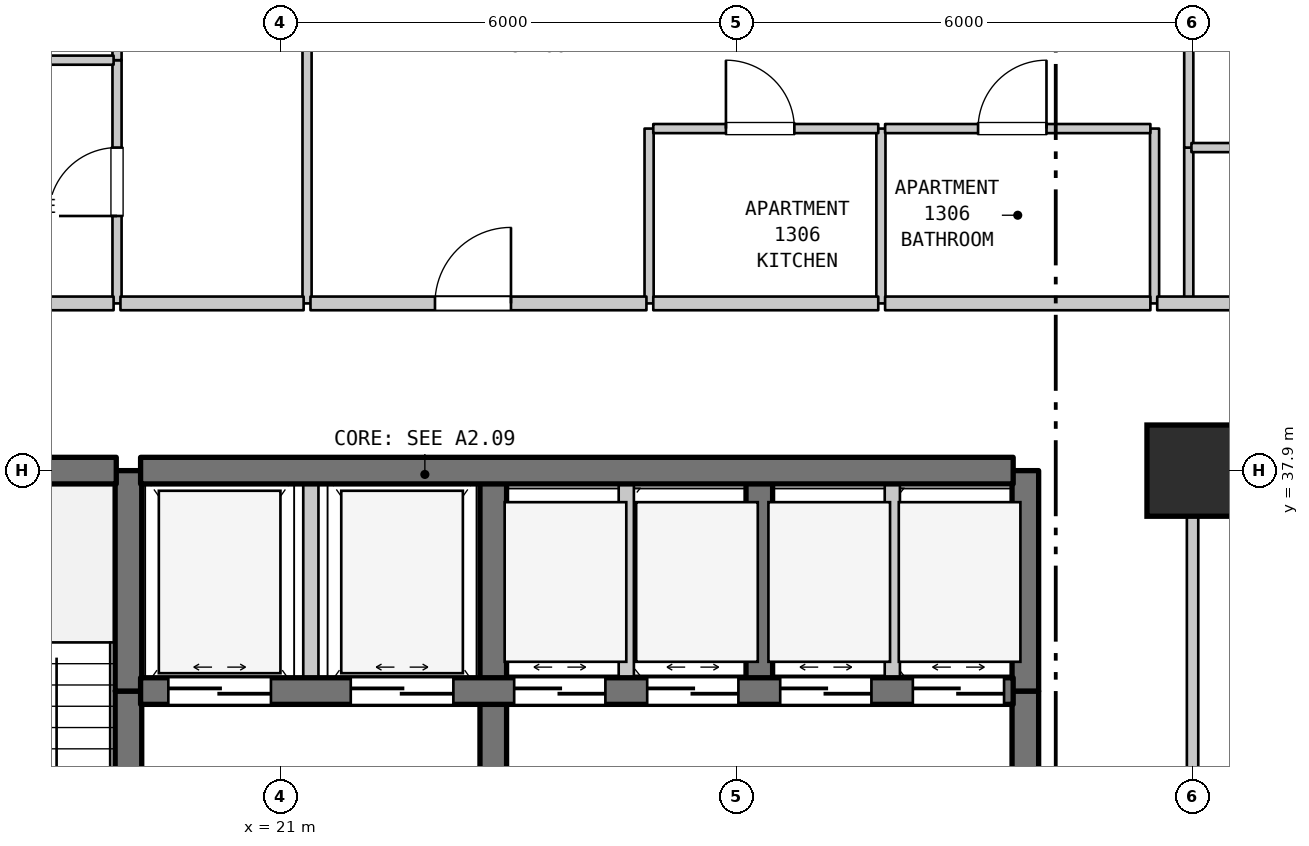
"""IFC4 building model, lengths in metres.
Left out: names, types, materials, properties, quantities, classifications, styles, units other than length and angle.
Written with IfcOpenShell. Run it as: python <this file> out.ifc"""

import sys

from ifc_helpers import new_model, si_unit, direction, frame, frame_2d, origin, origin_2d, place, context, subcontext, project, spatial, rectangle, extrude, element, fill, save


model = new_model("IFC4")
c1 = context("Model", 3, precision=1e-05, world=origin(), true_north=direction((0.0, 1.0)))
c2 = subcontext(c1, "Body", "Model", "MODEL_VIEW")
j1 = project(units=[si_unit("LENGTHUNIT", "METRE"), si_unit("PLANEANGLEUNIT", "RADIAN")], contexts=[c1])
p1 = place(None, origin())
s1 = spatial("IfcSite", under=j1, at=p1, CompositionType="ELEMENT")
p2 = place(p1, origin())
s2 = spatial("IfcBuilding", under=s1, at=p2, CompositionType="ELEMENT")
p3 = place(p2, frame((0.0, 0.0, 57.3)))
s3 = spatial("IfcBuildingStorey", under=s2, at=p3, CompositionType="ELEMENT", Elevation=57.3)
p4 = place(p3, frame((33.0, 37.9, 0.0), z_axis=(0.0, 0.0, 1.0), x_axis=(1.0, 0.0, 0.0)))
e1 = element("IfcColumn", 1, at=p4, inside=s3, PredefinedType="COLUMN", context=c2, shape_type="SweptSolid", body=[
    extrude(rectangle(XDim=1.2, YDim=1.2, at=origin_2d()), origin(), (0.0, 0.0, 1.0), 3.7),
])
p5 = place(p3, frame((18.85, 40.1, 0.0), z_axis=(0.0, 0.0, 1.0), x_axis=(0.0, 1.0, 0.0)))
e2 = element("IfcWall", 2, at=p5, inside=s3, PredefinedType="PARTITIONING", context=c2, shape_type="SweptSolid", body=[
    extrude(rectangle(XDim=3.2, YDim=0.12, at=frame_2d((1.6, 0.0))), origin(), (0.0, 0.0, 1.0), 3.28),
])
p6 = place(p5, frame((1.15, 0.0, 0.0)))
e3 = element("IfcOpeningElement", 3, at=p6, cuts=e2, PredefinedType="OPENING", context=c2, shape_type="SweptSolid", body=[
    extrude(rectangle(XDim=0.9, YDim=2.15, at=frame_2d((0.45, 1.075))), frame((0.0, 0.07, 0.0), z_axis=(0.0, -1.0, 0.0), x_axis=(1.0, 0.0, 0.0)), (0.0, 0.0, 1.0), 0.14),
])
p7 = place(p3, frame((18.85, 43.3, 0.0), z_axis=(0.0, 0.0, 1.0), x_axis=(0.0, 1.0, 0.0)))
e4 = element("IfcWall", 4, at=p7, inside=s3, PredefinedType="PARTITIONING", context=c2, shape_type="SweptSolid", body=[
    extrude(rectangle(XDim=2.9, YDim=0.12, at=frame_2d((1.45, 0.0))), origin(), (0.0, 0.0, 1.0), 3.28),
])
p8 = place(p3, frame((19.0, 29.5, 0.0), z_axis=(0.0, 0.0, 1.0), x_axis=(0.0, 1.0, 0.0)))
e5 = element("IfcWall", 5, at=p8, inside=s3, PredefinedType="SHEAR", context=c2, shape_type="SweptSolid", body=[
    extrude(rectangle(XDim=5.5, YDim=0.35, at=frame_2d((2.75, 0.0))), origin(), (0.0, 0.0, 1.0), 3.28),
])
p9 = place(p8, frame((2.025, 0.0, 0.0)))
e6 = element("IfcOpeningElement", 6, at=p9, cuts=e5, PredefinedType="OPENING", context=c2, shape_type="SweptSolid", body=[
    extrude(rectangle(XDim=1.1, YDim=2.15, at=frame_2d((0.55, 1.075))), frame((0.0, 0.185, 0.0), z_axis=(0.0, -1.0, 0.0), x_axis=(1.0, 0.0, 0.0)), (0.0, 0.0, 1.0), 0.37),
])
p10 = place(p3, frame((19.0, 35.0, 0.0), z_axis=(0.0, 0.0, 1.0), x_axis=(0.0, 1.0, 0.0)))
e7 = element("IfcWall", 7, at=p10, inside=s3, PredefinedType="SHEAR", context=c2, shape_type="SweptSolid", body=[
    extrude(rectangle(XDim=2.9, YDim=0.35, at=frame_2d((1.45, 0.0))), origin(), (0.0, 0.0, 1.0), 3.28),
])
p11 = place(p3, frame((21.35, 40.1, 0.0), z_axis=(0.0, 0.0, 1.0), x_axis=(0.0, 1.0, 0.0)))
e8 = element("IfcWall", 8, at=p11, inside=s3, PredefinedType="PARTITIONING", context=c2, shape_type="SweptSolid", body=[
    extrude(rectangle(XDim=13.79, YDim=0.12, at=frame_2d((6.895, 0.0))), origin(), (0.0, 0.0, 1.0), 3.28),
])
p12 = place(p3, frame((21.4, 35.0, 0.0), z_axis=(0.0, 0.0, 1.0), x_axis=(0.0, 1.0, 0.0)))
e9 = element("IfcWall", 9, at=p12, inside=s3, PredefinedType="STANDARD", context=c2, shape_type="SweptSolid", body=[
    extrude(rectangle(XDim=2.9, YDim=0.2, at=frame_2d((1.45, 0.0))), origin(), (0.0, 0.0, 1.0), 3.28),
])
p13 = place(p3, frame((23.8, 31.5, 0.0), z_axis=(0.0, 0.0, 1.0), x_axis=(0.0, 1.0, 0.0)))
e10 = element("IfcWall", 10, at=p13, inside=s3, PredefinedType="SHEAR", context=c2, shape_type="SweptSolid", body=[
    extrude(rectangle(XDim=3.5, YDim=0.35, at=frame_2d((1.75, 0.0))), origin(), (0.0, 0.0, 1.0), 3.28),
])
p14 = place(p13, frame((1.127, 0.0, 0.0)))
e11 = element("IfcOpeningElement", 11, at=p14, cuts=e10, PredefinedType="OPENING", context=c2, shape_type="SweptSolid", body=[
    extrude(rectangle(XDim=1.1, YDim=2.15, at=frame_2d((0.55, 1.075))), frame((0.0, 0.185, 0.0), z_axis=(0.0, -1.0, 0.0), x_axis=(1.0, 0.0, 0.0)), (0.0, 0.0, 1.0), 0.37),
])
p15 = place(p3, frame((23.8, 35.0, 0.0), z_axis=(0.0, 0.0, 1.0), x_axis=(0.0, 1.0, 0.0)))
e12 = element("IfcWall", 12, at=p15, inside=s3, PredefinedType="SHEAR", context=c2, shape_type="SweptSolid", body=[
    extrude(rectangle(XDim=2.9, YDim=0.35, at=frame_2d((1.45, 0.0))), origin(), (0.0, 0.0, 1.0), 3.28),
])
p16 = place(p3, frame((25.55, 35.0, 0.0), z_axis=(0.0, 0.0, 1.0), x_axis=(0.0, 1.0, 0.0)))
e13 = element("IfcWall", 13, at=p16, inside=s3, PredefinedType="STANDARD", context=c2, shape_type="SweptSolid", body=[
    extrude(rectangle(XDim=2.9, YDim=0.2, at=frame_2d((1.45, 0.0))), origin(), (0.0, 0.0, 1.0), 3.28),
])
p17 = place(p3, frame((25.85, 40.1, 0.0), z_axis=(0.0, 0.0, 1.0), x_axis=(0.0, 1.0, 0.0)))
e14 = element("IfcWall", 14, at=p17, inside=s3, PredefinedType="PARTITIONING", context=c2, shape_type="SweptSolid", body=[
    extrude(rectangle(XDim=2.3, YDim=0.12, at=frame_2d((1.15, 0.0))), origin(), (0.0, 0.0, 1.0), 3.28),
])
p18 = place(p3, frame((27.3, 35.0, 0.0), z_axis=(0.0, 0.0, 1.0), x_axis=(0.0, 1.0, 0.0)))
e15 = element("IfcWall", 15, at=p18, inside=s3, PredefinedType="SHEAR", context=c2, shape_type="SweptSolid", body=[
    extrude(rectangle(XDim=2.9, YDim=0.35, at=frame_2d((1.45, 0.0))), origin(), (0.0, 0.0, 1.0), 3.28),
])
p19 = place(p3, frame((28.9, 40.1, 0.0), z_axis=(0.0, 0.0, 1.0), x_axis=(0.0, 1.0, 0.0)))
e16 = element("IfcWall", 16, at=p19, inside=s3, PredefinedType="PARTITIONING", context=c2, shape_type="SweptSolid", body=[
    extrude(rectangle(XDim=2.3, YDim=0.12, at=frame_2d((1.15, 0.0))), origin(), (0.0, 0.0, 1.0), 3.28),
])
p20 = place(p3, frame((29.05, 35.0, 0.0), z_axis=(0.0, 0.0, 1.0), x_axis=(0.0, 1.0, 0.0)))
e17 = element("IfcWall", 17, at=p20, inside=s3, PredefinedType="STANDARD", context=c2, shape_type="SweptSolid", body=[
    extrude(rectangle(XDim=2.9, YDim=0.2, at=frame_2d((1.45, 0.0))), origin(), (0.0, 0.0, 1.0), 3.28),
])
p21 = place(p3, frame((30.8, 31.5, 0.0), z_axis=(0.0, 0.0, 1.0), x_axis=(0.0, 1.0, 0.0)))
e18 = element("IfcWall", 18, at=p21, inside=s3, PredefinedType="SHEAR", context=c2, shape_type="SweptSolid", body=[
    extrude(rectangle(XDim=3.5, YDim=0.35, at=frame_2d((1.75, 0.0))), origin(), (0.0, 0.0, 1.0), 3.28),
])
p22 = place(p21, frame((1.15, 0.0, 0.0)))
e19 = element("IfcOpeningElement", 19, at=p22, cuts=e18, PredefinedType="OPENING", context=c2, shape_type="SweptSolid", body=[
    extrude(rectangle(XDim=1.2, YDim=2.2, at=frame_2d((0.6, 1.1))), frame((0.0, 0.185, 0.0), z_axis=(0.0, -1.0, 0.0), x_axis=(1.0, 0.0, 0.0)), (0.0, 0.0, 1.0), 0.37),
])
p23 = place(p3, frame((30.8, 35.0, 0.0), z_axis=(0.0, 0.0, 1.0), x_axis=(0.0, 1.0, 0.0)))
e20 = element("IfcWall", 20, at=p23, inside=s3, PredefinedType="SHEAR", context=c2, shape_type="SweptSolid", body=[
    extrude(rectangle(XDim=2.9, YDim=0.35, at=frame_2d((1.45, 0.0))), origin(), (0.0, 0.0, 1.0), 3.28),
])
p24 = place(p3, frame((32.5, 40.1, 0.0), z_axis=(0.0, 0.0, 1.0), x_axis=(0.0, 1.0, 0.0)))
e21 = element("IfcWall", 21, at=p24, inside=s3, PredefinedType="PARTITIONING", context=c2, shape_type="SweptSolid", body=[
    extrude(rectangle(XDim=2.3, YDim=0.12, at=frame_2d((1.15, 0.0))), origin(), (0.0, 0.0, 1.0), 3.28),
])
p25 = place(p3, frame((32.95, 40.1, 0.0), z_axis=(0.0, 0.0, 1.0), x_axis=(0.0, 1.0, 0.0)))
e22 = element("IfcWall", 22, at=p25, inside=s3, PredefinedType="PARTITIONING", context=c2, shape_type="SweptSolid", body=[
    extrude(rectangle(XDim=2.05, YDim=0.12, at=frame_2d((1.025, 0.0))), origin(), (0.0, 0.0, 1.0), 2.68),
])
p26 = place(p3, frame((32.95, 42.15, 0.0), z_axis=(0.0, 0.0, 1.0), x_axis=(0.0, 1.0, 0.0)))
e23 = element("IfcWall", 23, at=p26, inside=s3, PredefinedType="PARTITIONING", context=c2, shape_type="SweptSolid", body=[
    extrude(rectangle(XDim=3.3, YDim=0.12, at=frame_2d((1.65, 0.0))), origin(), (0.0, 0.0, 1.0), 2.68),
])
p27 = place(p3, frame((33.0, 27.91, 0.0), z_axis=(0.0, 0.0, 1.0), x_axis=(0.0, 1.0, 0.0)))
e24 = element("IfcWall", 24, at=p27, inside=s3, PredefinedType="STANDARD", context=c2, shape_type="SweptSolid", body=[
    extrude(rectangle(XDim=9.98, YDim=0.15, at=frame_2d((4.99, 0.0))), origin(), (0.0, 0.0, 1.0), 2.78),
])
p28 = place(p3, frame((19.16, 35.0, 0.0), z_axis=(0.0, 0.0, 1.0), x_axis=(1.0, 0.0, 0.0)))
e25 = element("IfcWall", 25, at=p28, inside=s3, PredefinedType="SHEAR", context=c2, shape_type="SweptSolid", body=[
    extrude(rectangle(XDim=11.48, YDim=0.35, at=frame_2d((5.74, 0.0))), origin(), (0.0, 0.0, 1.0), 3.28),
])
p29 = place(p28, frame((0.365, 0.0, 0.0)))
e26 = element("IfcOpeningElement", 26, at=p29, cuts=e25, PredefinedType="OPENING", context=c2, shape_type="SweptSolid", body=[
    extrude(rectangle(XDim=1.35, YDim=2.2, at=frame_2d((0.675, 1.1))), frame((0.0, 0.185, 0.0), z_axis=(0.0, -1.0, 0.0), x_axis=(1.0, 0.0, 0.0)), (0.0, 0.0, 1.0), 0.37),
])
p30 = place(p28, frame((2.765, 0.0, 0.0)))
e27 = element("IfcOpeningElement", 27, at=p30, cuts=e25, PredefinedType="OPENING", context=c2, shape_type="SweptSolid", body=[
    extrude(rectangle(XDim=1.35, YDim=2.2, at=frame_2d((0.675, 1.1))), frame((0.0, 0.185, 0.0), z_axis=(0.0, -1.0, 0.0), x_axis=(1.0, 0.0, 0.0)), (0.0, 0.0, 1.0), 0.37),
])
p31 = place(p28, frame((4.915, 0.0, 0.0)))
e28 = element("IfcOpeningElement", 28, at=p31, cuts=e25, PredefinedType="OPENING", context=c2, shape_type="SweptSolid", body=[
    extrude(rectangle(XDim=1.2, YDim=2.2, at=frame_2d((0.6, 1.1))), frame((0.0, 0.185, 0.0), z_axis=(0.0, -1.0, 0.0), x_axis=(1.0, 0.0, 0.0)), (0.0, 0.0, 1.0), 0.37),
])
p32 = place(p28, frame((6.665, 0.0, 0.0)))
e29 = element("IfcOpeningElement", 29, at=p32, cuts=e25, PredefinedType="OPENING", context=c2, shape_type="SweptSolid", body=[
    extrude(rectangle(XDim=1.2, YDim=2.2, at=frame_2d((0.6, 1.1))), frame((0.0, 0.185, 0.0), z_axis=(0.0, -1.0, 0.0), x_axis=(1.0, 0.0, 0.0)), (0.0, 0.0, 1.0), 0.37),
])
p33 = place(p28, frame((8.415, 0.0, 0.0)))
e30 = element("IfcOpeningElement", 30, at=p33, cuts=e25, PredefinedType="OPENING", context=c2, shape_type="SweptSolid", body=[
    extrude(rectangle(XDim=1.2, YDim=2.2, at=frame_2d((0.6, 1.1))), frame((0.0, 0.185, 0.0), z_axis=(0.0, -1.0, 0.0), x_axis=(1.0, 0.0, 0.0)), (0.0, 0.0, 1.0), 0.37),
])
p34 = place(p28, frame((10.16, 0.0, 0.0)))
e31 = element("IfcOpeningElement", 31, at=p34, cuts=e25, PredefinedType="OPENING", context=c2, shape_type="SweptSolid", body=[
    extrude(rectangle(XDim=1.2, YDim=2.2, at=frame_2d((0.6, 1.1))), frame((0.0, 0.185, 0.0), z_axis=(0.0, -1.0, 0.0), x_axis=(1.0, 0.0, 0.0)), (0.0, 0.0, 1.0), 0.37),
])
p35 = place(p3, frame((15.16, 37.9, 0.0), z_axis=(0.0, 0.0, 1.0), x_axis=(1.0, 0.0, 0.0)))
e32 = element("IfcWall", 32, at=p35, inside=s3, PredefinedType="SHEAR", context=c2, shape_type="SweptSolid", body=[
    extrude(rectangle(XDim=3.68, YDim=0.35, at=frame_2d((1.84, 0.0))), origin(), (0.0, 0.0, 1.0), 3.28),
])
p36 = place(p3, frame((19.16, 37.9, 0.0), z_axis=(0.0, 0.0, 1.0), x_axis=(1.0, 0.0, 0.0)))
e33 = element("IfcWall", 33, at=p36, inside=s3, PredefinedType="SHEAR", context=c2, shape_type="SweptSolid", body=[
    extrude(rectangle(XDim=11.48, YDim=0.35, at=frame_2d((5.74, 0.0))), origin(), (0.0, 0.0, 1.0), 3.28),
])
p37 = place(p3, frame((33.07, 37.9, 0.0), z_axis=(0.0, 0.0, 1.0), x_axis=(1.0, 0.0, 0.0)))
e34 = element("IfcWall", 34, at=p37, inside=s3, PredefinedType="STANDARD", context=c2, shape_type="SweptSolid", body=[
    extrude(rectangle(XDim=26.935, YDim=0.15, at=frame_2d((13.467, 0.0))), origin(), (0.0, 0.0, 1.0), 3.28),
])
p38 = place(p3, frame((16.195, 40.1, 0.0), z_axis=(0.0, 0.0, 1.0), x_axis=(1.0, 0.0, 0.0)))
e35 = element("IfcWall", 35, at=p38, inside=s3, PredefinedType="STANDARD", context=c2, shape_type="SweptSolid", body=[
    extrude(rectangle(XDim=2.61, YDim=0.18, at=frame_2d((1.305, 0.0))), origin(), (0.0, 0.0, 1.0), 3.28),
])
p39 = place(p3, frame((18.895, 40.1, 0.0), z_axis=(0.0, 0.0, 1.0), x_axis=(1.0, 0.0, 0.0)))
e36 = element("IfcWall", 36, at=p39, inside=s3, PredefinedType="STANDARD", context=c2, shape_type="SweptSolid", body=[
    extrude(rectangle(XDim=2.41, YDim=0.18, at=frame_2d((1.205, 0.0))), origin(), (0.0, 0.0, 1.0), 3.28),
])
p40 = place(p3, frame((21.395, 40.1, 0.0), z_axis=(0.0, 0.0, 1.0), x_axis=(1.0, 0.0, 0.0)))
e37 = element("IfcWall", 37, at=p40, inside=s3, PredefinedType="STANDARD", context=c2, shape_type="SweptSolid", body=[
    extrude(rectangle(XDim=4.42, YDim=0.18, at=frame_2d((2.21, 0.0))), origin(), (0.0, 0.0, 1.0), 3.28),
])
p41 = place(p40, frame((1.638, 0.0, 0.0)))
e38 = element("IfcOpeningElement", 38, at=p41, cuts=e37, PredefinedType="OPENING", context=c2, shape_type="SweptSolid", body=[
    extrude(rectangle(XDim=1.0, YDim=2.15, at=frame_2d((0.5, 1.075))), frame((0.0, 0.1, 0.0), z_axis=(0.0, -1.0, 0.0), x_axis=(1.0, 0.0, 0.0)), (0.0, 0.0, 1.0), 0.2),
])
p42 = place(p3, frame((25.905, 40.1, 0.0), z_axis=(0.0, 0.0, 1.0), x_axis=(1.0, 0.0, 0.0)))
e39 = element("IfcWall", 39, at=p42, inside=s3, PredefinedType="STANDARD", context=c2, shape_type="SweptSolid", body=[
    extrude(rectangle(XDim=2.96, YDim=0.18, at=frame_2d((1.48, 0.0))), origin(), (0.0, 0.0, 1.0), 3.28),
])
p43 = place(p3, frame((28.955, 40.1, 0.0), z_axis=(0.0, 0.0, 1.0), x_axis=(1.0, 0.0, 0.0)))
e40 = element("IfcWall", 40, at=p43, inside=s3, PredefinedType="STANDARD", context=c2, shape_type="SweptSolid", body=[
    extrude(rectangle(XDim=3.49, YDim=0.18, at=frame_2d((1.745, 0.0))), origin(), (0.0, 0.0, 1.0), 3.28),
])
p44 = place(p3, frame((32.535, 40.1, 0.0), z_axis=(0.0, 0.0, 1.0), x_axis=(1.0, 0.0, 0.0)))
e41 = element("IfcWall", 41, at=p44, inside=s3, PredefinedType="STANDARD", context=c2, shape_type="SweptSolid", body=[
    extrude(rectangle(XDim=5.545, YDim=0.18, at=frame_2d((2.772, 0.0))), origin(), (0.0, 0.0, 1.0), 3.28),
])
p45 = place(p44, frame((2.435, 0.0, 0.0)))
e42 = element("IfcOpeningElement", 42, at=p45, cuts=e41, PredefinedType="OPENING", context=c2, shape_type="SweptSolid", body=[
    extrude(rectangle(XDim=1.0, YDim=2.15, at=frame_2d((0.5, 1.075))), frame((0.0, 0.1, 0.0), z_axis=(0.0, -1.0, 0.0), x_axis=(1.0, 0.0, 0.0)), (0.0, 0.0, 1.0), 0.2),
])
p46 = place(p3, frame((32.985, 42.15, 0.0), z_axis=(0.0, 0.0, 1.0), x_axis=(1.0, 0.0, 0.0)))
e43 = element("IfcWall", 43, at=p46, inside=s3, PredefinedType="PARTITIONING", context=c2, shape_type="SweptSolid", body=[
    extrude(rectangle(XDim=2.16, YDim=0.12, at=frame_2d((1.08, 0.0))), origin(), (0.0, 0.0, 1.0), 3.28),
])
p47 = place(p46, frame((0.553, 0.0, 0.0)))
e44 = element("IfcOpeningElement", 44, at=p47, cuts=e43, PredefinedType="OPENING", context=c2, shape_type="SweptSolid", body=[
    extrude(rectangle(XDim=0.9, YDim=2.15, at=frame_2d((0.45, 1.075))), frame((0.0, 0.07, 0.0), z_axis=(0.0, -1.0, 0.0), x_axis=(1.0, 0.0, 0.0)), (0.0, 0.0, 1.0), 0.14),
])
p48 = place(p3, frame((25.905, 42.4, 0.0), z_axis=(0.0, 0.0, 1.0), x_axis=(1.0, 0.0, 0.0)))
e45 = element("IfcWall", 45, at=p48, inside=s3, PredefinedType="PARTITIONING", context=c2, shape_type="SweptSolid", body=[
    extrude(rectangle(XDim=2.96, YDim=0.12, at=frame_2d((1.48, 0.0))), origin(), (0.0, 0.0, 1.0), 3.28),
])
p49 = place(p48, frame((0.956, 0.0, 0.0)))
e46 = element("IfcOpeningElement", 46, at=p49, cuts=e45, PredefinedType="OPENING", context=c2, shape_type="SweptSolid", body=[
    extrude(rectangle(XDim=0.9, YDim=2.15, at=frame_2d((0.45, 1.075))), frame((0.0, 0.07, 0.0), z_axis=(0.0, -1.0, 0.0), x_axis=(1.0, 0.0, 0.0)), (0.0, 0.0, 1.0), 0.14),
])
p50 = place(p3, frame((28.955, 42.4, 0.0), z_axis=(0.0, 0.0, 1.0), x_axis=(1.0, 0.0, 0.0)))
e47 = element("IfcWall", 47, at=p50, inside=s3, PredefinedType="PARTITIONING", context=c2, shape_type="SweptSolid", body=[
    extrude(rectangle(XDim=3.49, YDim=0.12, at=frame_2d((1.745, 0.0))), origin(), (0.0, 0.0, 1.0), 3.28),
])
p51 = place(p50, frame((1.223, 0.0, 0.0)))
e48 = element("IfcOpeningElement", 48, at=p51, cuts=e47, PredefinedType="OPENING", context=c2, shape_type="SweptSolid", body=[
    extrude(rectangle(XDim=0.9, YDim=2.1, at=frame_2d((0.45, 1.05))), frame((0.0, 0.07, 0.0), z_axis=(0.0, -1.0, 0.0), x_axis=(1.0, 0.0, 0.0)), (0.0, 0.0, 1.0), 0.14),
])
p52 = place(p3, frame((16.195, 43.3, 0.0), z_axis=(0.0, 0.0, 1.0), x_axis=(1.0, 0.0, 0.0)))
e49 = element("IfcWall", 49, at=p52, inside=s3, PredefinedType="PARTITIONING", context=c2, shape_type="SweptSolid", body=[
    extrude(rectangle(XDim=2.61, YDim=0.12, at=frame_2d((1.305, 0.0))), origin(), (0.0, 0.0, 1.0), 3.28),
])
p53 = place(p6, origin())
e50 = element("IfcDoor", 50, at=p53, inside=s3, OperationType="SINGLE_SWING_LEFT", PredefinedType="DOOR", context=c2, shape_type="SweptSolid", body=[
    extrude(rectangle(XDim=0.9, YDim=2.15, at=frame_2d((0.45, 1.075))), frame((0.0, 0.025, 0.0), z_axis=(0.0, -1.0, 0.0), x_axis=(1.0, 0.0, 0.0)), (0.0, 0.0, 1.0), 0.05),
])
fill(e3, e50)
p54 = place(p29, origin())
e51 = element("IfcDoor", 51, at=p54, inside=s3, OperationType="DOUBLE_DOOR_SLIDING", PredefinedType="DOOR", context=c2, shape_type="SweptSolid", body=[
    extrude(rectangle(XDim=1.35, YDim=2.2, at=frame_2d((0.675, 1.1))), frame((0.0, 0.025, 0.0), z_axis=(0.0, -1.0, 0.0), x_axis=(1.0, 0.0, 0.0)), (0.0, 0.0, 1.0), 0.05),
])
fill(e26, e51)
p55 = place(p30, origin())
e52 = element("IfcDoor", 52, at=p55, inside=s3, OperationType="DOUBLE_DOOR_SLIDING", PredefinedType="DOOR", context=c2, shape_type="SweptSolid", body=[
    extrude(rectangle(XDim=1.35, YDim=2.2, at=frame_2d((0.675, 1.1))), frame((0.0, 0.025, 0.0), z_axis=(0.0, -1.0, 0.0), x_axis=(1.0, 0.0, 0.0)), (0.0, 0.0, 1.0), 0.05),
])
fill(e27, e52)
p56 = place(p31, origin())
e53 = element("IfcDoor", 53, at=p56, inside=s3, OperationType="DOUBLE_DOOR_SLIDING", PredefinedType="DOOR", context=c2, shape_type="SweptSolid", body=[
    extrude(rectangle(XDim=1.2, YDim=2.2, at=frame_2d((0.6, 1.1))), frame((0.0, 0.025, 0.0), z_axis=(0.0, -1.0, 0.0), x_axis=(1.0, 0.0, 0.0)), (0.0, 0.0, 1.0), 0.05),
])
fill(e28, e53)
p57 = place(p32, origin())
e54 = element("IfcDoor", 54, at=p57, inside=s3, OperationType="DOUBLE_DOOR_SLIDING", PredefinedType="DOOR", context=c2, shape_type="SweptSolid", body=[
    extrude(rectangle(XDim=1.2, YDim=2.2, at=frame_2d((0.6, 1.1))), frame((0.0, 0.025, 0.0), z_axis=(0.0, -1.0, 0.0), x_axis=(1.0, 0.0, 0.0)), (0.0, 0.0, 1.0), 0.05),
])
fill(e29, e54)
p58 = place(p33, origin())
e55 = element("IfcDoor", 55, at=p58, inside=s3, OperationType="DOUBLE_DOOR_SLIDING", PredefinedType="DOOR", context=c2, shape_type="SweptSolid", body=[
    extrude(rectangle(XDim=1.2, YDim=2.2, at=frame_2d((0.6, 1.1))), frame((0.0, 0.025, 0.0), z_axis=(0.0, -1.0, 0.0), x_axis=(1.0, 0.0, 0.0)), (0.0, 0.0, 1.0), 0.05),
])
fill(e30, e55)
p59 = place(p34, origin())
e56 = element("IfcDoor", 56, at=p59, inside=s3, OperationType="DOUBLE_DOOR_SLIDING", PredefinedType="DOOR", context=c2, shape_type="SweptSolid", body=[
    extrude(rectangle(XDim=1.2, YDim=2.2, at=frame_2d((0.6, 1.1))), frame((0.0, 0.025, 0.0), z_axis=(0.0, -1.0, 0.0), x_axis=(1.0, 0.0, 0.0)), (0.0, 0.0, 1.0), 0.05),
])
fill(e31, e56)
p60 = place(p41, origin())
e57 = element("IfcDoor", 57, at=p60, inside=s3, OperationType="SINGLE_SWING_RIGHT", PredefinedType="DOOR", context=c2, shape_type="SweptSolid", body=[
    extrude(rectangle(XDim=1.0, YDim=2.15, at=frame_2d((0.5, 1.075))), frame((0.0, 0.025, 0.0), z_axis=(0.0, -1.0, 0.0), x_axis=(1.0, 0.0, 0.0)), (0.0, 0.0, 1.0), 0.05),
])
fill(e38, e57)
p61 = place(p49, origin())
e58 = element("IfcDoor", 58, at=p61, inside=s3, OperationType="SINGLE_SWING_LEFT", PredefinedType="DOOR", context=c2, shape_type="SweptSolid", body=[
    extrude(rectangle(XDim=0.9, YDim=2.15, at=frame_2d((0.45, 1.075))), frame((0.0, 0.025, 0.0), z_axis=(0.0, -1.0, 0.0), x_axis=(1.0, 0.0, 0.0)), (0.0, 0.0, 1.0), 0.05),
])
fill(e46, e58)
p62 = place(p51, origin())
e59 = element("IfcDoor", 59, at=p62, inside=s3, OperationType="SINGLE_SWING_RIGHT", PredefinedType="DOOR", context=c2, shape_type="SweptSolid", body=[
    extrude(rectangle(XDim=0.9, YDim=2.1, at=frame_2d((0.45, 1.05))), frame((0.0, 0.025, 0.0), z_axis=(0.0, -1.0, 0.0), x_axis=(1.0, 0.0, 0.0)), (0.0, 0.0, 1.0), 0.05),
])
fill(e48, e59)
save(model, sys.argv[1])
